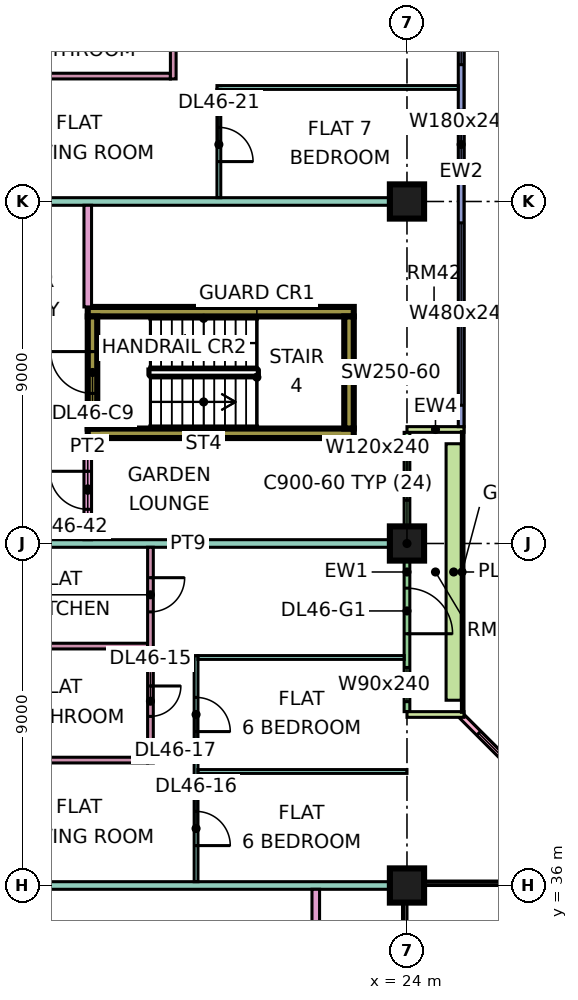
"""IFC4 building model, lengths in metres.
Left out: names, types, materials, properties, quantities, classifications, styles, units other than length and angle.
Written with IfcOpenShell. Run it as: python <this file> out.ifc"""

import sys

from ifc_helpers import new_model, si_unit, direction, frame, frame_2d, origin, origin_2d, place, context, subcontext, project, spatial, rectangle, extrude, element, fill, save


model = new_model("IFC4")
c1 = context("Model", 3, precision=1e-05, world=origin(), true_north=direction((0.0, 1.0)))
c2 = subcontext(c1, "Body", "Model", "MODEL_VIEW")
j1 = project(units=[si_unit("LENGTHUNIT", "METRE"), si_unit("PLANEANGLEUNIT", "RADIAN")], contexts=[c1])
p1 = place(None, origin())
s1 = spatial("IfcSite", under=j1, at=p1, CompositionType="ELEMENT")
p2 = place(p1, origin())
s2 = spatial("IfcBuilding", under=s1, at=p2, CompositionType="ELEMENT")
p3 = place(p2, frame((0.0, 0.0, 198.65)))
s3 = spatial("IfcBuildingStorey", under=s2, at=p3, CompositionType="ELEMENT", Elevation=198.65)
for number, where, z_axis, x_axis in (
    (1, (24.0, 36.0, 0.0), (0.0, 0.0, 1.0), (1.0, 0.0, 0.0)),
    (2, (24.0, 45.0, 0.0), (0.0, 0.0, 1.0), (1.0, 0.0, 0.0)),
    (3, (24.0, 54.0, 0.0), (0.0, 0.0, 1.0), (1.0, 0.0, 0.0)),
):
    element("IfcColumn", number, at=place(p3, frame(where, z_axis=z_axis, x_axis=x_axis)), inside=s3, PredefinedType="COLUMN", context=c2, shape_type="SweptSolid", body=[
        extrude(rectangle(XDim=0.9, YDim=0.9, at=origin_2d()), origin(), (0.0, 0.0, 1.0), 3.75),
    ])
for number, where, z_axis, x_axis in (
    (4, (15.6, 47.9, 0.0), (0.0, 0.0, 1.0), (1.0, 0.0, 0.0)),
    (5, (15.6, 51.1, 0.0), (0.0, 0.0, 1.0), (1.0, 0.0, 0.0)),
):
    element("IfcWall", number, at=place(p3, frame(where, z_axis=z_axis, x_axis=x_axis)), inside=s3, PredefinedType="SHEAR", context=c2, shape_type="SweptSolid", body=[
        extrude(rectangle(XDim=7.0, YDim=0.25, at=frame_2d((3.5, 0.0))), origin(), (0.0, 0.0, 1.0), 3.75),
    ])
p4 = place(p3, frame((15.725, 48.025, 0.0), z_axis=(0.0, 0.0, 1.0), x_axis=(0.0, 1.0, 0.0)))
e6 = element("IfcWall", 6, at=p4, inside=s3, PredefinedType="SHEAR", context=c2, shape_type="SweptSolid", body=[
    extrude(rectangle(XDim=2.95, YDim=0.25, at=frame_2d((1.475, 0.0))), origin(), (0.0, 0.0, 1.0), 3.75),
])
p5 = place(p4, frame((0.925, 0.0, 0.0)))
e7 = element("IfcOpeningElement", 7, at=p5, cuts=e6, PredefinedType="OPENING", context=c2, shape_type="SweptSolid", body=[
    extrude(rectangle(XDim=1.1, YDim=2.2, at=frame_2d((0.55, 1.1))), frame((0.0, 0.135, 0.0), z_axis=(0.0, -1.0, 0.0), x_axis=(1.0, 0.0, 0.0)), (0.0, 0.0, 1.0), 0.27),
])
p6 = place(p3, frame((22.475, 48.025, 0.0), z_axis=(0.0, 0.0, 1.0), x_axis=(0.0, 1.0, 0.0)))
e8 = element("IfcWall", 8, at=p6, inside=s3, PredefinedType="SHEAR", context=c2, shape_type="SweptSolid", body=[
    extrude(rectangle(XDim=2.95, YDim=0.25, at=frame_2d((1.475, 0.0))), origin(), (0.0, 0.0, 1.0), 3.75),
])
p7 = place(p3, frame((28.447, 37.447, 0.0), z_axis=(0.0, 0.0, 1.0), x_axis=(-0.707106781187, 0.707106781187, 0.0)))
e9 = element("IfcWall", 9, at=p7, inside=s3, PredefinedType="SOLIDWALL", context=c2, shape_type="SweptSolid", body=[
    extrude(rectangle(XDim=4.243, YDim=0.15, at=frame_2d((2.121, 0.0))), origin(), (0.0, 0.0, 1.0), 3.35),
])
p8 = place(p7, frame((0.621, 0.0, 0.45)))
e10 = element("IfcOpeningElement", 10, at=p8, cuts=e9, PredefinedType="OPENING", context=c2, shape_type="SweptSolid", body=[
    extrude(rectangle(XDim=3.0, YDim=2.4, at=frame_2d((1.5, 1.2))), frame((0.0, 0.085, 0.0), z_axis=(0.0, -1.0, 0.0), x_axis=(1.0, 0.0, 0.0)), (0.0, 0.0, 1.0), 0.17),
])
p9 = place(p3, frame((24.0, 40.575, 0.0), z_axis=(0.0, 0.0, 1.0), x_axis=(0.0, 1.0, 0.0)))
e11 = element("IfcWall", 11, at=p9, inside=s3, PredefinedType="SOLIDWALL", context=c2, shape_type="SweptSolid", body=[
    extrude(rectangle(XDim=7.35, YDim=0.15, at=frame_2d((3.675, 0.0))), origin(), (0.0, 0.0, 1.0), 3.35),
])
p10 = place(p9, frame((0.262, 0.0, 0.45)))
e12 = element("IfcOpeningElement", 12, at=p10, cuts=e11, PredefinedType="OPENING", context=c2, shape_type="SweptSolid", body=[
    extrude(rectangle(XDim=0.9, YDim=2.4, at=frame_2d((0.45, 1.2))), frame((0.0, 0.085, 0.0), z_axis=(0.0, -1.0, 0.0), x_axis=(1.0, 0.0, 0.0)), (0.0, 0.0, 1.0), 0.17),
])
p11 = place(p9, frame((2.05, 0.0, 0.0)))
e13 = element("IfcOpeningElement", 13, at=p11, cuts=e11, PredefinedType="OPENING", context=c2, shape_type="SweptSolid", body=[
    extrude(rectangle(XDim=1.2, YDim=2.4, at=frame_2d((0.6, 1.2))), frame((0.0, 0.085, 0.0), z_axis=(0.0, -1.0, 0.0), x_axis=(1.0, 0.0, 0.0)), (0.0, 0.0, 1.0), 0.17),
])
p12 = place(p9, frame((5.562, 0.0, 0.45)))
e14 = element("IfcOpeningElement", 14, at=p12, cuts=e11, PredefinedType="OPENING", context=c2, shape_type="SweptSolid", body=[
    extrude(rectangle(XDim=1.2, YDim=2.4, at=frame_2d((0.6, 1.2))), frame((0.0, 0.085, 0.0), z_axis=(0.0, -1.0, 0.0), x_axis=(1.0, 0.0, 0.0)), (0.0, 0.0, 1.0), 0.17),
])
for number, where, z_axis, x_axis in (
    (15, (25.5, 40.5, 0.0), (0.0, 0.0, 1.0), (-1.0, 0.0, 0.0)),
    (16, (25.5, 48.0, 0.0), (0.0, 0.0, 1.0), (-1.0, 0.0, 0.0)),
):
    element("IfcWall", number, at=place(p3, frame(where, z_axis=z_axis, x_axis=x_axis)), inside=s3, PredefinedType="SOLIDWALL", context=c2, shape_type="SweptSolid", body=[
        extrude(rectangle(XDim=1.5, YDim=0.15, at=frame_2d((0.75, 0.0))), origin(), (0.0, 0.0, 1.0), 3.35),
    ])
p13 = place(p3, frame((25.425, 48.075, 0.0), z_axis=(0.0, 0.0, 1.0), x_axis=(0.0, 1.0, 0.0)))
e17 = element("IfcWall", 17, at=p13, inside=s3, PredefinedType="SOLIDWALL", context=c2, shape_type="SweptSolid", body=[
    extrude(rectangle(XDim=13.425, YDim=0.15, at=frame_2d((6.712, 0.0))), origin(), (0.0, 0.0, 1.0), 3.35),
])
p14 = place(p13, frame((0.562, 0.0, 0.45)))
e18 = element("IfcOpeningElement", 18, at=p14, cuts=e17, PredefinedType="OPENING", context=c2, shape_type="SweptSolid", body=[
    extrude(rectangle(XDim=4.8, YDim=2.4, at=frame_2d((2.4, 1.2))), frame((0.0, 0.085, 0.0), z_axis=(0.0, -1.0, 0.0), x_axis=(1.0, 0.0, 0.0)), (0.0, 0.0, 1.0), 0.17),
])
p15 = place(p13, frame((6.525, 0.0, 0.45)))
e19 = element("IfcOpeningElement", 19, at=p15, cuts=e17, PredefinedType="OPENING", context=c2, shape_type="SweptSolid", body=[
    extrude(rectangle(XDim=1.8, YDim=2.4, at=frame_2d((0.9, 1.2))), frame((0.0, 0.085, 0.0), z_axis=(0.0, -1.0, 0.0), x_axis=(1.0, 0.0, 0.0)), (0.0, 0.0, 1.0), 0.17),
])
p16 = place(p13, frame((9.525, 0.0, 0.45)))
e20 = element("IfcOpeningElement", 20, at=p16, cuts=e17, PredefinedType="OPENING", context=c2, shape_type="SweptSolid", body=[
    extrude(rectangle(XDim=1.8, YDim=2.4, at=frame_2d((0.9, 1.2))), frame((0.0, 0.085, 0.0), z_axis=(0.0, -1.0, 0.0), x_axis=(1.0, 0.0, 0.0)), (0.0, 0.0, 1.0), 0.17),
])
p17 = place(p13, frame((12.225, 0.0, 0.45)))
e21 = element("IfcOpeningElement", 21, at=p17, cuts=e17, PredefinedType="OPENING", context=c2, shape_type="SweptSolid", body=[
    extrude(rectangle(XDim=0.9, YDim=2.4, at=frame_2d((0.45, 1.2))), frame((0.0, 0.085, 0.0), z_axis=(0.0, -1.0, 0.0), x_axis=(1.0, 0.0, 0.0)), (0.0, 0.0, 1.0), 0.17),
])
p18 = place(p3, frame((25.229, 40.875, 0.0), z_axis=(0.0, 0.0, 1.0), x_axis=(0.0, 1.0, 0.0)))
e22 = element("IfcWall", 22, at=p18, inside=s3, PredefinedType="SOLIDWALL", context=c2, shape_type="SweptSolid", body=[
    extrude(rectangle(XDim=6.75, YDim=0.4, at=frame_2d((3.375, 0.0))), origin(), (0.0, 0.0, 1.0), 0.7),
])
p19 = place(p3, frame((12.55, 36.0, 0.0), z_axis=(0.0, 0.0, 1.0), x_axis=(1.0, 0.0, 0.0)))
e23 = element("IfcWall", 23, at=p19, inside=s3, PredefinedType="PARTITIONING", context=c2, shape_type="SweptSolid", body=[
    extrude(rectangle(XDim=11.45, YDim=0.2, at=frame_2d((5.725, 0.0))), origin(), (0.0, 0.0, 1.0), 3.35),
])
for number, where, z_axis, x_axis in (
    (24, (12.55, 39.3, 0.0), (0.0, 0.0, 1.0), (1.0, 0.0, 0.0)),
    (25, (12.55, 42.3, 0.0), (0.0, 0.0, 1.0), (1.0, 0.0, 0.0)),
):
    element("IfcWall", number, at=place(p3, frame(where, z_axis=z_axis, x_axis=x_axis)), inside=s3, PredefinedType="PARTITIONING", context=c2, shape_type="SweptSolid", body=[
        extrude(rectangle(XDim=4.625, YDim=0.15, at=frame_2d((2.312, 0.0))), origin(), (0.0, 0.0, 1.0), 3.35),
    ])
p20 = place(p3, frame((12.55, 45.0, 0.0), z_axis=(0.0, 0.0, 1.0), x_axis=(1.0, 0.0, 0.0)))
e26 = element("IfcWall", 26, at=p20, inside=s3, PredefinedType="PARTITIONING", context=c2, shape_type="SweptSolid", body=[
    extrude(rectangle(XDim=11.376, YDim=0.2, at=frame_2d((5.688, 0.0))), origin(), (0.0, 0.0, 1.0), 3.35),
])
p21 = place(p3, frame((12.55, 54.0, 0.0), z_axis=(0.0, 0.0, 1.0), x_axis=(1.0, 0.0, 0.0)))
e27 = element("IfcWall", 27, at=p21, inside=s3, PredefinedType="PARTITIONING", context=c2, shape_type="SweptSolid", body=[
    extrude(rectangle(XDim=11.45, YDim=0.2, at=frame_2d((5.725, 0.0))), origin(), (0.0, 0.0, 1.0), 3.35),
])
p22 = place(p3, frame((12.55, 57.3, 0.0), z_axis=(0.0, 0.0, 1.0), x_axis=(1.0, 0.0, 0.0)))
e28 = element("IfcWall", 28, at=p22, inside=s3, PredefinedType="PARTITIONING", context=c2, shape_type="SweptSolid", body=[
    extrude(rectangle(XDim=5.225, YDim=0.15, at=frame_2d((2.612, 0.0))), origin(), (0.0, 0.0, 1.0), 3.35),
])
p23 = place(p3, frame((15.6, 45.1, 0.0), z_axis=(0.0, 0.0, 1.0), x_axis=(0.0, 1.0, 0.0)))
e29 = element("IfcWall", 29, at=p23, inside=s3, PredefinedType="PARTITIONING", context=c2, shape_type="SweptSolid", body=[
    extrude(rectangle(XDim=2.675, YDim=0.2, at=frame_2d((1.337, 0.0))), origin(), (0.0, 0.0, 1.0), 3.35),
])
p24 = place(p23, frame((0.8, 0.0, 0.0)))
e30 = element("IfcOpeningElement", 30, at=p24, cuts=e29, PredefinedType="OPENING", context=c2, shape_type="SweptSolid", body=[
    extrude(rectangle(XDim=1.0, YDim=2.1, at=frame_2d((0.5, 1.05))), frame((0.0, 0.11, 0.0), z_axis=(0.0, -1.0, 0.0), x_axis=(1.0, 0.0, 0.0)), (0.0, 0.0, 1.0), 0.22),
])
p25 = place(p3, frame((15.6, 51.225, 0.0), z_axis=(0.0, 0.0, 1.0), x_axis=(0.0, 1.0, 0.0)))
e31 = element("IfcWall", 31, at=p25, inside=s3, PredefinedType="PARTITIONING", context=c2, shape_type="SweptSolid", body=[
    extrude(rectangle(XDim=2.675, YDim=0.2, at=frame_2d((1.337, 0.0))), origin(), (0.0, 0.0, 1.0), 3.35),
])
p26 = place(p3, frame((17.25, 39.225, 0.0), z_axis=(0.0, 0.0, 1.0), x_axis=(0.0, 1.0, 0.0)))
e32 = element("IfcWall", 32, at=p26, inside=s3, PredefinedType="PARTITIONING", context=c2, shape_type="SweptSolid", body=[
    extrude(rectangle(XDim=5.675, YDim=0.15, at=frame_2d((2.837, 0.0))), origin(), (0.0, 0.0, 1.0), 3.35),
])
p27 = place(p26, frame((1.225, 0.0, 0.0)))
e33 = element("IfcOpeningElement", 33, at=p27, cuts=e32, PredefinedType="OPENING", context=c2, shape_type="SweptSolid", body=[
    extrude(rectangle(XDim=0.8, YDim=2.1, at=frame_2d((0.4, 1.05))), frame((0.0, 0.085, 0.0), z_axis=(0.0, -1.0, 0.0), x_axis=(1.0, 0.0, 0.0)), (0.0, 0.0, 1.0), 0.17),
])
p28 = place(p26, frame((3.975, 0.0, 0.0)))
e34 = element("IfcOpeningElement", 34, at=p28, cuts=e32, PredefinedType="OPENING", context=c2, shape_type="SweptSolid", body=[
    extrude(rectangle(XDim=0.9, YDim=2.1, at=frame_2d((0.45, 1.05))), frame((0.0, 0.085, 0.0), z_axis=(0.0, -1.0, 0.0), x_axis=(1.0, 0.0, 0.0)), (0.0, 0.0, 1.0), 0.17),
])
p29 = place(p3, frame((17.85, 57.225, 0.0), z_axis=(0.0, 0.0, 1.0), x_axis=(0.0, 1.0, 0.0)))
e35 = element("IfcWall", 35, at=p29, inside=s3, PredefinedType="PARTITIONING", context=c2, shape_type="SweptSolid", body=[
    extrude(rectangle(XDim=5.701, YDim=0.15, at=frame_2d((2.851, 0.0))), origin(), (0.0, 0.0, 1.0), 3.35),
])
p30 = place(p29, frame((0.775, 0.0, 0.0)))
e36 = element("IfcOpeningElement", 36, at=p30, cuts=e35, PredefinedType="OPENING", context=c2, shape_type="SweptSolid", body=[
    extrude(rectangle(XDim=0.8, YDim=2.1, at=frame_2d((0.4, 1.05))), frame((0.0, 0.085, 0.0), z_axis=(0.0, -1.0, 0.0), x_axis=(1.0, 0.0, 0.0)), (0.0, 0.0, 1.0), 0.17),
])
p31 = place(p29, frame((3.525, 0.0, 0.0)))
e37 = element("IfcOpeningElement", 37, at=p31, cuts=e35, PredefinedType="OPENING", context=c2, shape_type="SweptSolid", body=[
    extrude(rectangle(XDim=0.9, YDim=2.1, at=frame_2d((0.45, 1.05))), frame((0.0, 0.085, 0.0), z_axis=(0.0, -1.0, 0.0), x_axis=(1.0, 0.0, 0.0)), (0.0, 0.0, 1.0), 0.17),
])
p32 = place(p3, frame((18.45, 36.1, 0.0), z_axis=(0.0, 0.0, 1.0), x_axis=(0.0, 1.0, 0.0)))
e38 = element("IfcWall", 38, at=p32, inside=s3, PredefinedType="PARTITIONING", context=c2, shape_type="SweptSolid", body=[
    extrude(rectangle(XDim=5.95, YDim=0.1, at=frame_2d((2.975, 0.0))), origin(), (0.0, 0.0, 1.0), 3.35),
])
p33 = place(p32, frame((0.95, 0.0, 0.0)))
e39 = element("IfcOpeningElement", 39, at=p33, cuts=e38, PredefinedType="OPENING", context=c2, shape_type="SweptSolid", body=[
    extrude(rectangle(XDim=0.9, YDim=2.1, at=frame_2d((0.45, 1.05))), frame((0.0, 0.06, 0.0), z_axis=(0.0, -1.0, 0.0), x_axis=(1.0, 0.0, 0.0)), (0.0, 0.0, 1.0), 0.12),
])
p34 = place(p32, frame((3.95, 0.0, 0.0)))
e40 = element("IfcOpeningElement", 40, at=p34, cuts=e38, PredefinedType="OPENING", context=c2, shape_type="SweptSolid", body=[
    extrude(rectangle(XDim=0.9, YDim=2.1, at=frame_2d((0.45, 1.05))), frame((0.0, 0.06, 0.0), z_axis=(0.0, -1.0, 0.0), x_axis=(1.0, 0.0, 0.0)), (0.0, 0.0, 1.0), 0.12),
])
p35 = place(p3, frame((18.5, 39.0, 0.0), z_axis=(0.0, 0.0, 1.0), x_axis=(1.0, 0.0, 0.0)))
e41 = element("IfcWall", 41, at=p35, inside=s3, PredefinedType="PARTITIONING", context=c2, shape_type="SweptSolid", body=[
    extrude(rectangle(XDim=5.5, YDim=0.1, at=frame_2d((2.75, 0.0))), origin(), (0.0, 0.0, 1.0), 3.35),
])
p36 = place(p3, frame((18.5, 42.0, 0.0), z_axis=(0.0, 0.0, 1.0), x_axis=(1.0, 0.0, 0.0)))
e42 = element("IfcWall", 42, at=p36, inside=s3, PredefinedType="PARTITIONING", context=c2, shape_type="SweptSolid", body=[
    extrude(rectangle(XDim=5.426, YDim=0.1, at=frame_2d((2.713, 0.0))), origin(), (0.0, 0.0, 1.0), 3.35),
])
p37 = place(p3, frame((19.0, 57.0, 0.0), z_axis=(0.0, 0.0, 1.0), x_axis=(1.0, 0.0, 0.0)))
e43 = element("IfcWall", 43, at=p37, inside=s3, PredefinedType="PARTITIONING", context=c2, shape_type="SweptSolid", body=[
    extrude(rectangle(XDim=6.35, YDim=0.1, at=frame_2d((3.175, 0.0))), origin(), (0.0, 0.0, 1.0), 3.35),
])
p38 = place(p3, frame((19.05, 54.1, 0.0), z_axis=(0.0, 0.0, 1.0), x_axis=(0.0, 1.0, 0.0)))
e44 = element("IfcWall", 44, at=p38, inside=s3, PredefinedType="PARTITIONING", context=c2, shape_type="SweptSolid", body=[
    extrude(rectangle(XDim=2.85, YDim=0.1, at=frame_2d((1.425, 0.0))), origin(), (0.0, 0.0, 1.0), 3.35),
])
p39 = place(p38, frame((0.95, 0.0, 0.0)))
e45 = element("IfcOpeningElement", 45, at=p39, cuts=e44, PredefinedType="OPENING", context=c2, shape_type="SweptSolid", body=[
    extrude(rectangle(XDim=0.9, YDim=2.1, at=frame_2d((0.45, 1.05))), frame((0.0, 0.06, 0.0), z_axis=(0.0, -1.0, 0.0), x_axis=(1.0, 0.0, 0.0)), (0.0, 0.0, 1.0), 0.12),
])
p40 = place(p3, frame((21.6, 23.9, 0.0), z_axis=(0.0, 0.0, 1.0), x_axis=(0.0, 1.0, 0.0)))
e46 = element("IfcWall", 46, at=p40, inside=s3, PredefinedType="PARTITIONING", context=c2, shape_type="SweptSolid", body=[
    extrude(rectangle(XDim=12.0, YDim=0.2, at=frame_2d((6.0, 0.0))), origin(), (0.0, 0.0, 1.0), 3.35),
])
p41 = place(p8, origin())
e47 = element("IfcWindow", 47, at=p41, inside=s3, PartitioningType="SINGLE_PANEL", PredefinedType="WINDOW", context=c2, shape_type="SweptSolid", body=[
    extrude(rectangle(XDim=3.0, YDim=2.4, at=frame_2d((1.5, 1.2))), frame((0.0, 0.03, 0.0), z_axis=(0.0, -1.0, 0.0), x_axis=(1.0, 0.0, 0.0)), (0.0, 0.0, 1.0), 0.06),
])
fill(e10, e47)
p42 = place(p10, origin())
e48 = element("IfcWindow", 48, at=p42, inside=s3, PartitioningType="SINGLE_PANEL", PredefinedType="WINDOW", context=c2, shape_type="SweptSolid", body=[
    extrude(rectangle(XDim=0.9, YDim=2.4, at=frame_2d((0.45, 1.2))), frame((0.0, 0.03, 0.0), z_axis=(0.0, -1.0, 0.0), x_axis=(1.0, 0.0, 0.0)), (0.0, 0.0, 1.0), 0.06),
])
fill(e12, e48)
p43 = place(p11, frame((1.2, 0.0, 0.0), z_axis=(0.0, 0.0, 1.0), x_axis=(-1.0, 0.0, 0.0)))
e49 = element("IfcDoor", 49, at=p43, inside=s3, OperationType="DOUBLE_DOOR_SINGLE_SWING", PredefinedType="DOOR", context=c2, shape_type="SweptSolid", body=[
    extrude(rectangle(XDim=1.2, YDim=2.4, at=frame_2d((0.6, 1.2))), frame((0.0, 0.025, 0.0), z_axis=(0.0, -1.0, 0.0), x_axis=(1.0, 0.0, 0.0)), (0.0, 0.0, 1.0), 0.05),
])
fill(e13, e49)
p44 = place(p12, origin())
e50 = element("IfcWindow", 50, at=p44, inside=s3, PartitioningType="SINGLE_PANEL", PredefinedType="WINDOW", context=c2, shape_type="SweptSolid", body=[
    extrude(rectangle(XDim=1.2, YDim=2.4, at=frame_2d((0.6, 1.2))), frame((0.0, 0.03, 0.0), z_axis=(0.0, -1.0, 0.0), x_axis=(1.0, 0.0, 0.0)), (0.0, 0.0, 1.0), 0.06),
])
fill(e14, e50)
p45 = place(p14, origin())
e51 = element("IfcWindow", 51, at=p45, inside=s3, PartitioningType="SINGLE_PANEL", PredefinedType="WINDOW", context=c2, shape_type="SweptSolid", body=[
    extrude(rectangle(XDim=4.8, YDim=2.4, at=frame_2d((2.4, 1.2))), frame((0.0, 0.03, 0.0), z_axis=(0.0, -1.0, 0.0), x_axis=(1.0, 0.0, 0.0)), (0.0, 0.0, 1.0), 0.06),
])
fill(e18, e51)
p46 = place(p15, origin())
e52 = element("IfcWindow", 52, at=p46, inside=s3, PartitioningType="SINGLE_PANEL", PredefinedType="WINDOW", context=c2, shape_type="SweptSolid", body=[
    extrude(rectangle(XDim=1.8, YDim=2.4, at=frame_2d((0.9, 1.2))), frame((0.0, 0.03, 0.0), z_axis=(0.0, -1.0, 0.0), x_axis=(1.0, 0.0, 0.0)), (0.0, 0.0, 1.0), 0.06),
])
fill(e19, e52)
p47 = place(p16, origin())
e53 = element("IfcWindow", 53, at=p47, inside=s3, PartitioningType="SINGLE_PANEL", PredefinedType="WINDOW", context=c2, shape_type="SweptSolid", body=[
    extrude(rectangle(XDim=1.8, YDim=2.4, at=frame_2d((0.9, 1.2))), frame((0.0, 0.03, 0.0), z_axis=(0.0, -1.0, 0.0), x_axis=(1.0, 0.0, 0.0)), (0.0, 0.0, 1.0), 0.06),
])
fill(e20, e53)
p48 = place(p5, frame((1.1, 0.0, 0.0), z_axis=(0.0, 0.0, 1.0), x_axis=(-1.0, 0.0, 0.0)))
e54 = element("IfcDoor", 54, at=p48, inside=s3, OperationType="SINGLE_SWING_RIGHT", PredefinedType="DOOR", context=c2, shape_type="SweptSolid", body=[
    extrude(rectangle(XDim=1.1, YDim=2.2, at=frame_2d((0.55, 1.1))), frame((0.0, 0.025, 0.0), z_axis=(0.0, -1.0, 0.0), x_axis=(1.0, 0.0, 0.0)), (0.0, 0.0, 1.0), 0.05),
])
fill(e7, e54)
p49 = place(p27, origin())
e55 = element("IfcDoor", 55, at=p49, inside=s3, OperationType="SINGLE_SWING_RIGHT", PredefinedType="DOOR", context=c2, shape_type="SweptSolid", body=[
    extrude(rectangle(XDim=0.8, YDim=2.1, at=frame_2d((0.4, 1.05))), frame((0.0, 0.025, 0.0), z_axis=(0.0, -1.0, 0.0), x_axis=(1.0, 0.0, 0.0)), (0.0, 0.0, 1.0), 0.05),
])
fill(e33, e55)
p50 = place(p33, frame((0.9, 0.0, 0.0), z_axis=(0.0, 0.0, 1.0), x_axis=(-1.0, 0.0, 0.0)))
e56 = element("IfcDoor", 56, at=p50, inside=s3, OperationType="SINGLE_SWING_LEFT", PredefinedType="DOOR", context=c2, shape_type="SweptSolid", body=[
    extrude(rectangle(XDim=0.9, YDim=2.1, at=frame_2d((0.45, 1.05))), frame((0.0, 0.025, 0.0), z_axis=(0.0, -1.0, 0.0), x_axis=(1.0, 0.0, 0.0)), (0.0, 0.0, 1.0), 0.05),
])
fill(e39, e56)
p51 = place(p34, frame((0.9, 0.0, 0.0), z_axis=(0.0, 0.0, 1.0), x_axis=(-1.0, 0.0, 0.0)))
e57 = element("IfcDoor", 57, at=p51, inside=s3, OperationType="SINGLE_SWING_LEFT", PredefinedType="DOOR", context=c2, shape_type="SweptSolid", body=[
    extrude(rectangle(XDim=0.9, YDim=2.1, at=frame_2d((0.45, 1.05))), frame((0.0, 0.025, 0.0), z_axis=(0.0, -1.0, 0.0), x_axis=(1.0, 0.0, 0.0)), (0.0, 0.0, 1.0), 0.05),
])
fill(e40, e57)
p52 = place(p28, origin())
e58 = element("IfcDoor", 58, at=p52, inside=s3, OperationType="SINGLE_SWING_RIGHT", PredefinedType="DOOR", context=c2, shape_type="SweptSolid", body=[
    extrude(rectangle(XDim=0.9, YDim=2.1, at=frame_2d((0.45, 1.05))), frame((0.0, 0.025, 0.0), z_axis=(0.0, -1.0, 0.0), x_axis=(1.0, 0.0, 0.0)), (0.0, 0.0, 1.0), 0.05),
])
fill(e34, e58)
p53 = place(p39, frame((0.9, 0.0, 0.0), z_axis=(0.0, 0.0, 1.0), x_axis=(-1.0, 0.0, 0.0)))
e59 = element("IfcDoor", 59, at=p53, inside=s3, OperationType="SINGLE_SWING_LEFT", PredefinedType="DOOR", context=c2, shape_type="SweptSolid", body=[
    extrude(rectangle(XDim=0.9, YDim=2.1, at=frame_2d((0.45, 1.05))), frame((0.0, 0.025, 0.0), z_axis=(0.0, -1.0, 0.0), x_axis=(1.0, 0.0, 0.0)), (0.0, 0.0, 1.0), 0.05),
])
fill(e45, e59)
p54 = place(p24, frame((1.0, 0.0, 0.0), z_axis=(0.0, 0.0, 1.0), x_axis=(-1.0, 0.0, 0.0)))
e60 = element("IfcDoor", 60, at=p54, inside=s3, OperationType="SINGLE_SWING_RIGHT", PredefinedType="DOOR", context=c2, shape_type="SweptSolid", body=[
    extrude(rectangle(XDim=1.0, YDim=2.1, at=frame_2d((0.5, 1.05))), frame((0.0, 0.025, 0.0), z_axis=(0.0, -1.0, 0.0), x_axis=(1.0, 0.0, 0.0)), (0.0, 0.0, 1.0), 0.05),
])
fill(e30, e60)
save(model, sys.argv[1])
